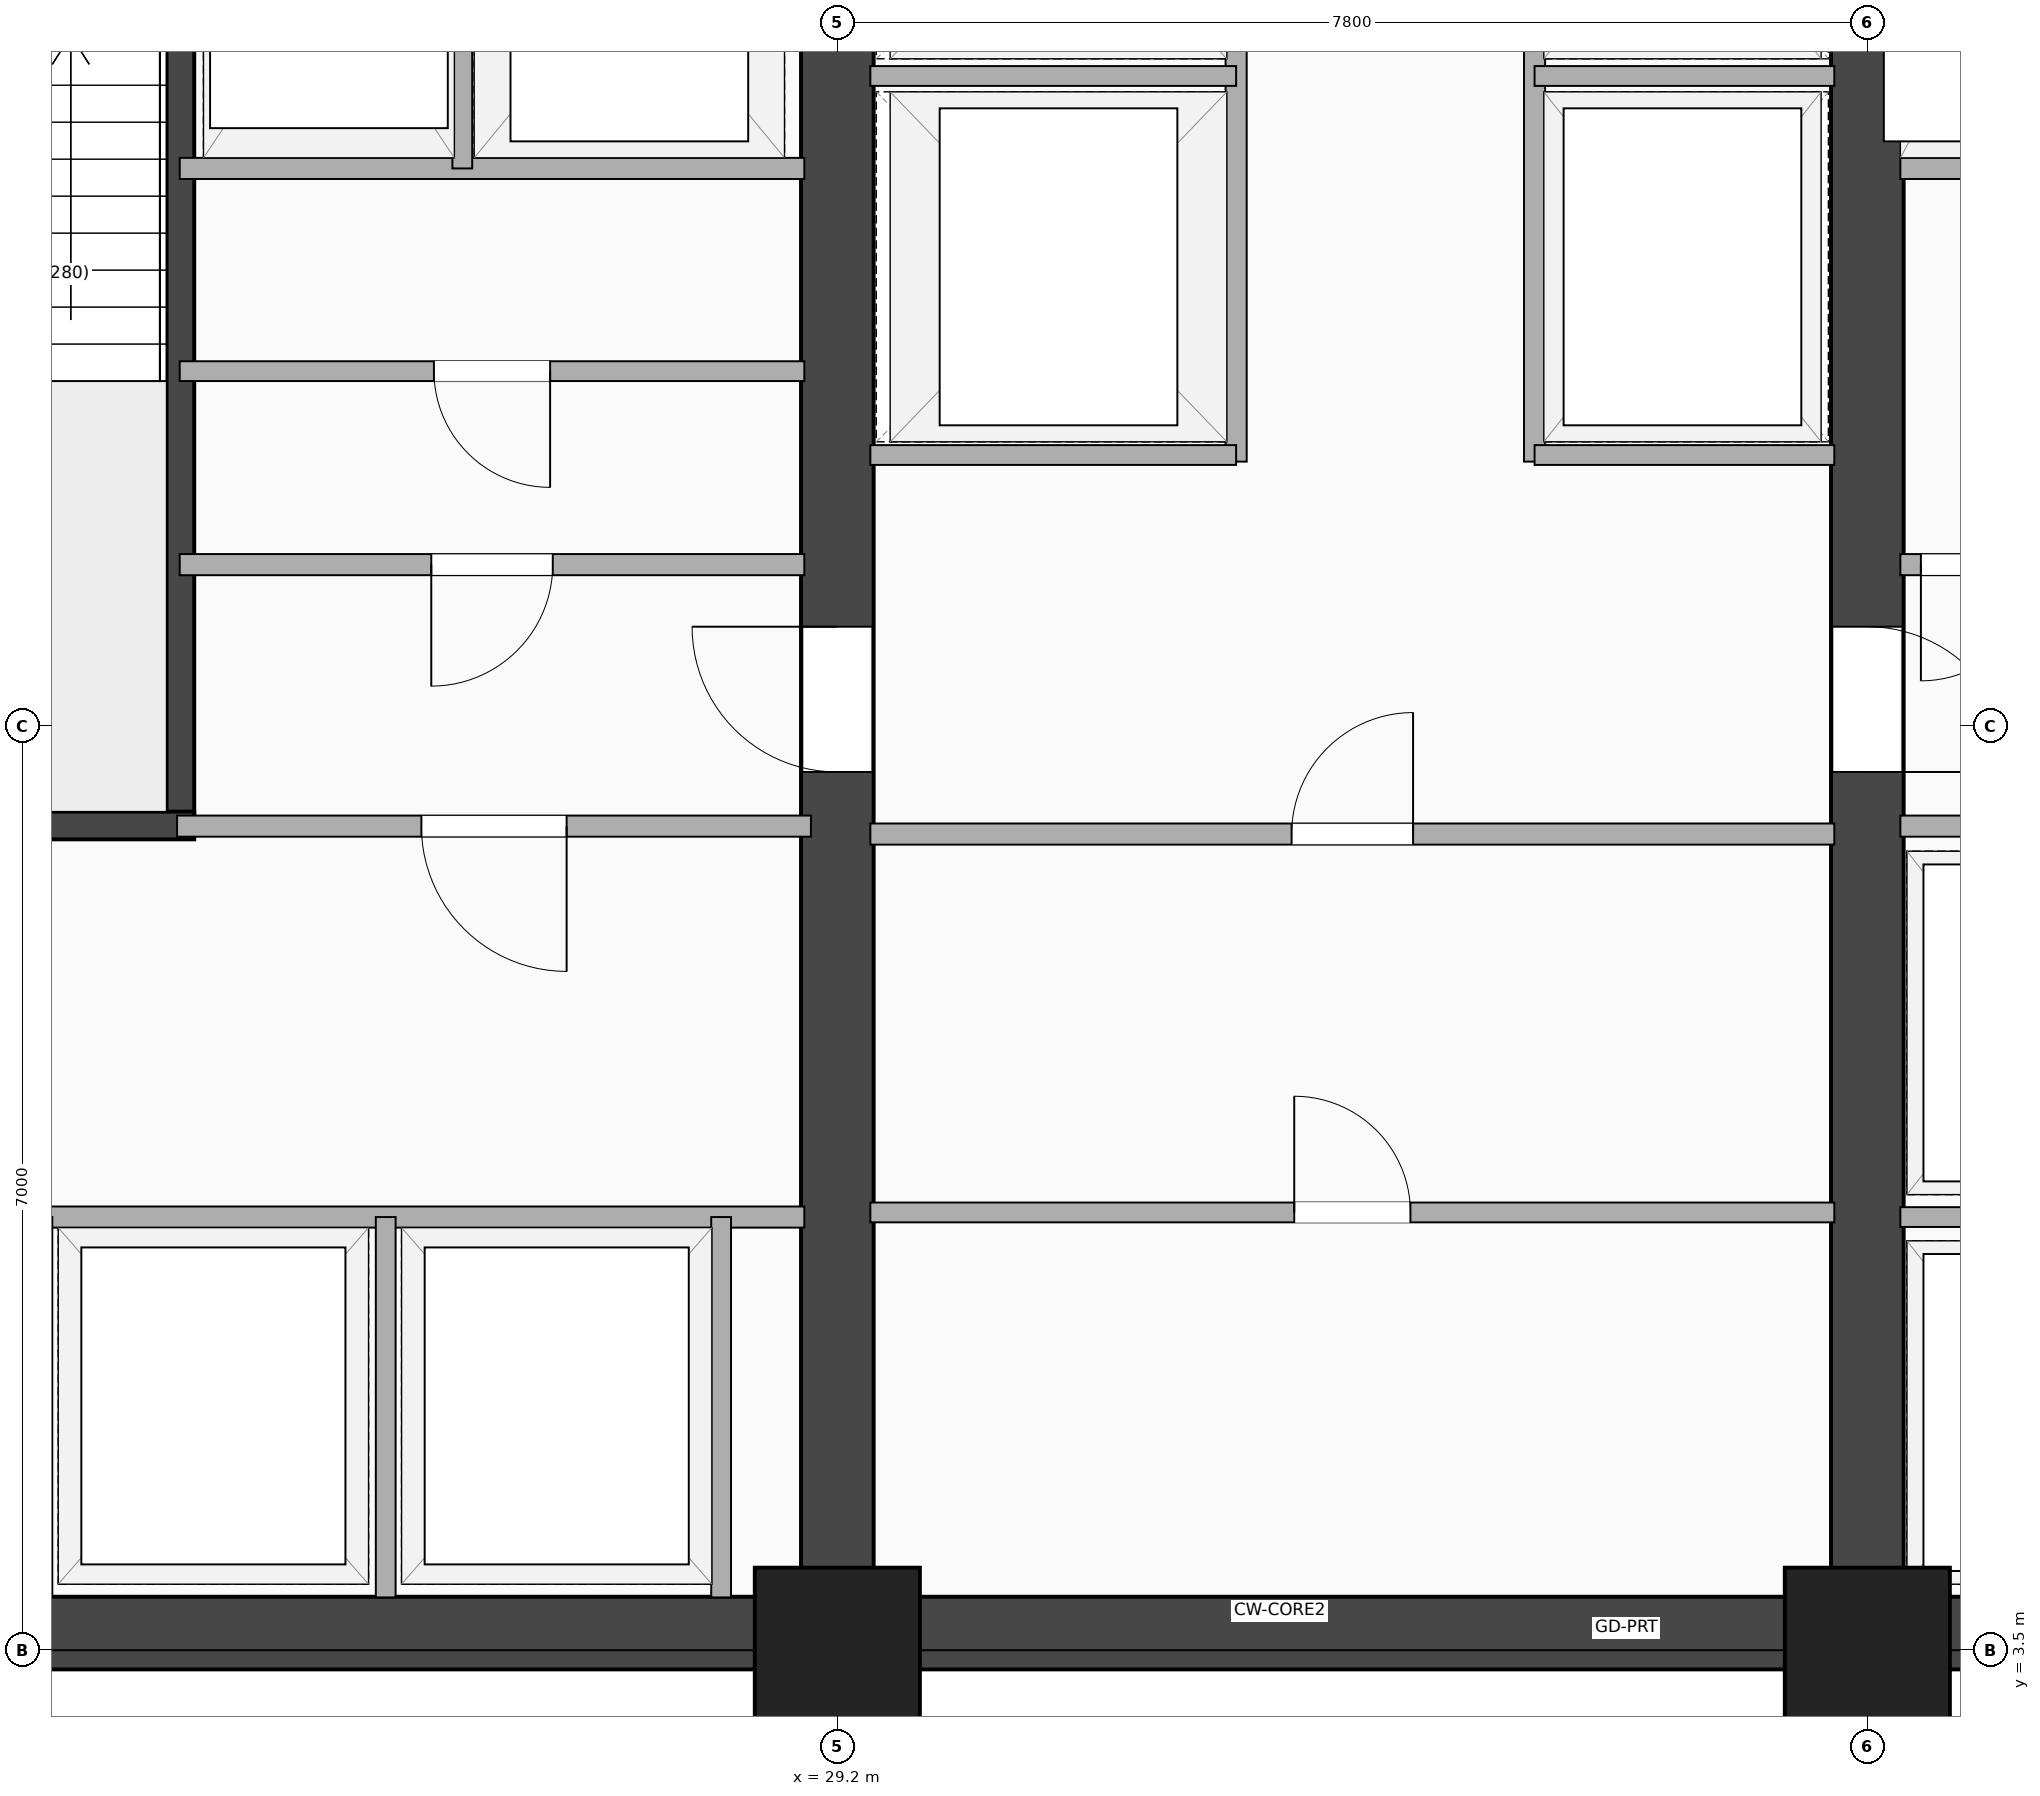
"""IFC4 building model, lengths in metres.
Left out: names, types, materials, properties, quantities, classifications, styles, units other than length and angle.
Written with IfcOpenShell. Run it as: python <this file> out.ifc"""

import sys

from ifc_helpers import new_model, si_unit, direction, frame, frame_2d, origin, origin_2d, place, context, subcontext, project, spatial, rectangle, extrude, element, fill, save


model = new_model("IFC4")
c1 = context("Model", 3, precision=1e-05, world=origin(), true_north=direction((0.0, 1.0)))
c2 = subcontext(c1, "Body", "Model", "MODEL_VIEW")
j1 = project(units=[si_unit("LENGTHUNIT", "METRE"), si_unit("PLANEANGLEUNIT", "RADIAN")], contexts=[c1])
p1 = place(None, origin())
s1 = spatial("IfcSite", under=j1, at=p1, CompositionType="ELEMENT")
p2 = place(p1, origin())
s2 = spatial("IfcBuilding", under=s1, at=p2, CompositionType="ELEMENT")
p3 = place(p2, frame((0.0, 0.0, 130.2)))
s3 = spatial("IfcBuildingStorey", under=s2, at=p3, CompositionType="ELEMENT", Elevation=130.2)
p4 = place(p3, frame((20.3, 3.63, 0.0), z_axis=(0.0, 0.0, 1.0), x_axis=(1.0, 0.0, 0.0)))
e1 = element("IfcWall", 1, at=p4, inside=s3, PredefinedType="SHEAR", context=c2, shape_type="SweptSolid", body=[
    extrude(rectangle(XDim=24.5, YDim=0.55, at=frame_2d((12.25, 0.0))), origin(), (0.0, 0.0, 1.0), 8.15),
])
p5 = place(p3, frame((29.2, 3.5, 0.0), z_axis=(0.0, 0.0, 1.0), x_axis=(0.0, 1.0, 0.0)))
e2 = element("IfcWall", 2, at=p5, inside=s3, PredefinedType="SHEAR", context=c2, shape_type="SweptSolid", body=[
    extrude(rectangle(XDim=16.9, YDim=0.55, at=frame_2d((8.45, 0.0))), origin(), (0.0, 0.0, 1.0), 8.15),
])
p6 = place(p5, frame((7.75, 0.0, 0.0), z_axis=(0.0, 0.0, 1.0), x_axis=(-1.0, 0.0, 0.0)))
e3 = element("IfcOpeningElement", 3, at=p6, cuts=e2, PredefinedType="OPENING", context=c2, shape_type="SweptSolid", body=[
    extrude(rectangle(XDim=1.1, YDim=2.15, at=frame_2d((0.55, 1.075))), frame((0.0, 0.285, 0.0), z_axis=(0.0, -1.0, 0.0), x_axis=(1.0, 0.0, 0.0)), (0.0, 0.0, 1.0), 0.57),
])
p7 = place(p3, frame((37.0, 3.5, 0.0), z_axis=(0.0, 0.0, 1.0), x_axis=(0.0, 1.0, 0.0)))
e4 = element("IfcWall", 4, at=p7, inside=s3, PredefinedType="SHEAR", context=c2, shape_type="SweptSolid", body=[
    extrude(rectangle(XDim=16.9, YDim=0.55, at=frame_2d((8.45, 0.0))), origin(), (0.0, 0.0, 1.0), 8.15),
])
p8 = place(p7, frame((6.65, 0.0, 0.0)))
e5 = element("IfcOpeningElement", 5, at=p8, cuts=e4, PredefinedType="OPENING", context=c2, shape_type="SweptSolid", body=[
    extrude(rectangle(XDim=1.1, YDim=2.15, at=frame_2d((0.55, 1.075))), frame((0.0, 0.285, 0.0), z_axis=(0.0, -1.0, 0.0), x_axis=(1.0, 0.0, 0.0)), (0.0, 0.0, 1.0), 0.57),
])
p9 = place(p3, frame((24.225, 9.745, 0.0), z_axis=(0.0, 0.0, 1.0), x_axis=(0.0, 1.0, 0.0)))
e6 = element("IfcWall", 6, at=p9, inside=s3, PredefinedType="SHEAR", context=c2, shape_type="SweptSolid", body=[
    extrude(rectangle(XDim=8.01, YDim=0.21, at=frame_2d((4.005, 0.0))), origin(), (0.0, 0.0, 1.0), 8.15),
])
p10 = place(p3, frame((20.67, 9.745, 0.0), z_axis=(0.0, 0.0, 1.0), x_axis=(1.0, 0.0, 0.0)))
e7 = element("IfcWall", 7, at=p10, inside=s3, PredefinedType="SHEAR", context=c2, shape_type="SweptSolid", body=[
    extrude(rectangle(XDim=3.66, YDim=0.21, at=frame_2d((1.83, 0.0))), origin(), (0.0, 0.0, 1.0), 8.15),
])
for number, where, z_axis, x_axis in (
    (8, (29.2, 3.5, -0.32), (0.0, 0.0, 1.0), (1.0, 0.0, 0.0)),
    (9, (37.0, 3.5, -0.32), (0.0, 0.0, 1.0), (1.0, 0.0, 0.0)),
):
    element("IfcColumn", number, at=place(p3, frame(where, z_axis=z_axis, x_axis=x_axis)), inside=s3, PredefinedType="COLUMN", context=c2, shape_type="SweptSolid", body=[
        extrude(rectangle(XDim=1.25, YDim=1.25, at=origin_2d()), origin(), (0.0, 0.0, 1.0), 8.47),
    ])
p11 = place(p3, frame((24.22, 14.72, 0.0), z_axis=(0.0, 0.0, 1.0), x_axis=(1.0, 0.0, 0.0)))
e10 = element("IfcWall", 10, at=p11, inside=s3, PredefinedType="PARTITIONING", context=c2, shape_type="SweptSolid", body=[
    extrude(rectangle(XDim=4.73, YDim=0.16, at=frame_2d((2.365, 0.0))), origin(), (0.0, 0.0, 1.0), 8.15),
])
p12 = place(p3, frame((26.36, 14.72, 0.0), z_axis=(0.0, 0.0, 1.0), x_axis=(0.0, 1.0, 0.0)))
e11 = element("IfcWall", 11, at=p12, inside=s3, PredefinedType="PARTITIONING", context=c2, shape_type="SweptSolid", body=[
    extrude(rectangle(XDim=3.04, YDim=0.15, at=frame_2d((1.52, 0.0))), origin(), (0.0, 0.0, 1.0), 8.15),
])
p13 = place(p3, frame((37.25, 14.72, 0.0), z_axis=(0.0, 0.0, 1.0), x_axis=(1.0, 0.0, 0.0)))
e12 = element("IfcWall", 12, at=p13, inside=s3, PredefinedType="PARTITIONING", context=c2, shape_type="SweptSolid", body=[
    extrude(rectangle(XDim=3.61, YDim=0.16, at=frame_2d((1.805, 0.0))), origin(), (0.0, 0.0, 1.0), 8.15),
])
p14 = place(p3, frame((24.22, 11.72, 0.0), z_axis=(0.0, 0.0, 1.0), x_axis=(1.0, 0.0, 0.0)))
e13 = element("IfcWall", 13, at=p14, inside=s3, PredefinedType="PARTITIONING", context=c2, shape_type="SweptSolid", body=[
    extrude(rectangle(XDim=4.73, YDim=0.16, at=frame_2d((2.365, 0.0))), origin(), (0.0, 0.0, 1.0), 8.15),
])
p15 = place(p14, frame((1.905, 0.0, 0.0)))
e14 = element("IfcOpeningElement", 14, at=p15, cuts=e13, PredefinedType="OPENING", context=c2, shape_type="SweptSolid", body=[
    extrude(rectangle(XDim=0.92, YDim=2.08, at=frame_2d((0.46, 1.04))), frame((0.0, 0.09, 0.0), z_axis=(0.0, -1.0, 0.0), x_axis=(1.0, 0.0, 0.0)), (0.0, 0.0, 1.0), 0.18),
])
p16 = place(p3, frame((24.22, 13.185, 0.0), z_axis=(0.0, 0.0, 1.0), x_axis=(1.0, 0.0, 0.0)))
e15 = element("IfcWall", 15, at=p16, inside=s3, PredefinedType="PARTITIONING", context=c2, shape_type="SweptSolid", body=[
    extrude(rectangle(XDim=4.73, YDim=0.15, at=frame_2d((2.365, 0.0))), origin(), (0.0, 0.0, 1.0), 8.15),
])
p17 = place(p16, frame((1.925, 0.0, 0.0)))
e16 = element("IfcOpeningElement", 16, at=p17, cuts=e15, PredefinedType="OPENING", context=c2, shape_type="SweptSolid", body=[
    extrude(rectangle(XDim=0.88, YDim=2.08, at=frame_2d((0.44, 1.04))), frame((0.0, 0.085, 0.0), z_axis=(0.0, -1.0, 0.0), x_axis=(1.0, 0.0, 0.0)), (0.0, 0.0, 1.0), 0.17),
])
p18 = place(p3, frame((37.25, 11.72, 0.0), z_axis=(0.0, 0.0, 1.0), x_axis=(1.0, 0.0, 0.0)))
e17 = element("IfcWall", 17, at=p18, inside=s3, PredefinedType="PARTITIONING", context=c2, shape_type="SweptSolid", body=[
    extrude(rectangle(XDim=1.191, YDim=0.16, at=frame_2d((0.596, 0.0))), origin(), (0.0, 0.0, 1.0), 8.15),
])
p19 = place(p18, frame((0.156, 0.0, 0.0)))
e18 = element("IfcOpeningElement", 18, at=p19, cuts=e17, PredefinedType="OPENING", context=c2, shape_type="SweptSolid", body=[
    extrude(rectangle(XDim=0.88, YDim=2.08, at=frame_2d((0.44, 1.04))), frame((0.0, 0.09, 0.0), z_axis=(0.0, -1.0, 0.0), x_axis=(1.0, 0.0, 0.0)), (0.0, 0.0, 1.0), 0.18),
])
p20 = place(p3, frame((20.65, 6.78, 0.0), z_axis=(0.0, 0.0, 1.0), x_axis=(1.0, 0.0, 0.0)))
e19 = element("IfcWall", 19, at=p20, inside=s3, PredefinedType="PARTITIONING", context=c2, shape_type="SweptSolid", body=[
    extrude(rectangle(XDim=8.3, YDim=0.16, at=frame_2d((4.15, 0.0))), origin(), (0.0, 0.0, 1.0), 7.223),
])
for number, where, z_axis, x_axis in (
    (20, (23.18, 3.9, 0.0), (0.0, 0.0, 1.0), (0.0, 1.0, 0.0)),
    (21, (25.78, 3.9, 0.0), (0.0, 0.0, 1.0), (0.0, 1.0, 0.0)),
    (22, (28.32, 3.9, 0.0), (0.0, 0.0, 1.0), (0.0, 1.0, 0.0)),
):
    element("IfcWall", number, at=place(p3, frame(where, z_axis=z_axis, x_axis=x_axis)), inside=s3, PredefinedType="PARTITIONING", context=c2, shape_type="SweptSolid", body=[
        extrude(rectangle(XDim=2.88, YDim=0.15, at=frame_2d((1.44, 0.0))), origin(), (0.0, 0.0, 1.0), 8.15),
    ])
p21 = place(p3, frame((24.2, 9.74, 0.0), z_axis=(0.0, 0.0, 1.0), x_axis=(1.0, 0.0, 0.0)))
e23 = element("IfcWall", 23, at=p21, inside=s3, PredefinedType="PARTITIONING", context=c2, shape_type="SweptSolid", body=[
    extrude(rectangle(XDim=4.8, YDim=0.16, at=frame_2d((2.4, 0.0))), origin(), (0.0, 0.0, 1.0), 8.15),
])
p22 = place(p21, frame((1.85, 0.0, 0.0)))
e24 = element("IfcOpeningElement", 24, at=p22, cuts=e23, PredefinedType="OPENING", context=c2, shape_type="SweptSolid", body=[
    extrude(rectangle(XDim=1.1, YDim=2.15, at=frame_2d((0.55, 1.075))), frame((0.0, 0.09, 0.0), z_axis=(0.0, -1.0, 0.0), x_axis=(1.0, 0.0, 0.0)), (0.0, 0.0, 1.0), 0.18),
])
p23 = place(p3, frame((37.25, 6.78, 0.0), z_axis=(0.0, 0.0, 1.0), x_axis=(1.0, 0.0, 0.0)))
e25 = element("IfcWall", 25, at=p23, inside=s3, PredefinedType="PARTITIONING", context=c2, shape_type="SweptSolid", body=[
    extrude(rectangle(XDim=2.17, YDim=0.15, at=frame_2d((1.085, 0.0))), origin(), (0.0, 0.0, 1.0), 8.15),
])
p24 = place(p3, frame((37.25, 9.74, 0.0), z_axis=(0.0, 0.0, 1.0), x_axis=(1.0, 0.0, 0.0)))
e26 = element("IfcWall", 26, at=p24, inside=s3, PredefinedType="PARTITIONING", context=c2, shape_type="SweptSolid", body=[
    extrude(rectangle(XDim=2.17, YDim=0.16, at=frame_2d((1.085, 0.0))), origin(), (0.0, 0.0, 1.0), 8.15),
])
p25 = place(p3, frame((29.45, 9.68, 0.0), z_axis=(0.0, 0.0, 1.0), x_axis=(1.0, 0.0, 0.0)))
e27 = element("IfcWall", 27, at=p25, inside=s3, PredefinedType="PARTITIONING", context=c2, shape_type="SweptSolid", body=[
    extrude(rectangle(XDim=7.3, YDim=0.16, at=frame_2d((3.65, 0.0))), origin(), (0.0, 0.0, 1.0), 8.15),
])
p26 = place(p25, frame((4.11, 0.0, 0.0), z_axis=(0.0, 0.0, 1.0), x_axis=(-1.0, 0.0, 0.0)))
e28 = element("IfcOpeningElement", 28, at=p26, cuts=e27, PredefinedType="OPENING", context=c2, shape_type="SweptSolid", body=[
    extrude(rectangle(XDim=0.92, YDim=2.08, at=frame_2d((0.46, 1.04))), frame((0.0, 0.09, 0.0), z_axis=(0.0, -1.0, 0.0), x_axis=(1.0, 0.0, 0.0)), (0.0, 0.0, 1.0), 0.18),
])
p27 = place(p3, frame((29.45, 6.815, 0.0), z_axis=(0.0, 0.0, 1.0), x_axis=(1.0, 0.0, 0.0)))
e29 = element("IfcWall", 29, at=p27, inside=s3, PredefinedType="PARTITIONING", context=c2, shape_type="SweptSolid", body=[
    extrude(rectangle(XDim=7.3, YDim=0.15, at=frame_2d((3.65, 0.0))), origin(), (0.0, 0.0, 1.0), 8.15),
])
p28 = place(p27, frame((4.09, 0.0, 0.0), z_axis=(0.0, 0.0, 1.0), x_axis=(-1.0, 0.0, 0.0)))
e30 = element("IfcOpeningElement", 30, at=p28, cuts=e29, PredefinedType="OPENING", context=c2, shape_type="SweptSolid", body=[
    extrude(rectangle(XDim=0.88, YDim=2.08, at=frame_2d((0.44, 1.04))), frame((0.0, 0.085, 0.0), z_axis=(0.0, -1.0, 0.0), x_axis=(1.0, 0.0, 0.0)), (0.0, 0.0, 1.0), 0.17),
])
p29 = place(p3, frame((32.22, 12.5, 0.0), z_axis=(0.0, 0.0, 1.0), x_axis=(0.0, 1.0, 0.0)))
e31 = element("IfcWall", 31, at=p29, inside=s3, PredefinedType="PARTITIONING", context=c2, shape_type="SweptSolid", body=[
    extrude(rectangle(XDim=7.92, YDim=0.16, at=frame_2d((3.96, 0.0))), origin(), (0.0, 0.0, 1.0), 7.524),
])
p30 = place(p29, frame((6.1, 0.0, 0.0)))
e32 = element("IfcOpeningElement", 32, at=p30, cuts=e31, PredefinedType="OPENING", context=c2, shape_type="SweptSolid", body=[
    extrude(rectangle(XDim=0.88, YDim=2.08, at=frame_2d((0.44, 1.04))), frame((0.0, 0.09, 0.0), z_axis=(0.0, -1.0, 0.0), x_axis=(1.0, 0.0, 0.0)), (0.0, 0.0, 1.0), 0.18),
])
p31 = place(p3, frame((34.48, 12.5, 0.0), z_axis=(0.0, 0.0, 1.0), x_axis=(0.0, 1.0, 0.0)))
e33 = element("IfcWall", 33, at=p31, inside=s3, PredefinedType="PARTITIONING", context=c2, shape_type="SweptSolid", body=[
    extrude(rectangle(XDim=7.92, YDim=0.16, at=frame_2d((3.96, 0.0))), origin(), (0.0, 0.0, 1.0), 7.524),
])
p32 = place(p31, frame((6.98, 0.0, 0.0), z_axis=(0.0, 0.0, 1.0), x_axis=(-1.0, 0.0, 0.0)))
e34 = element("IfcOpeningElement", 34, at=p32, cuts=e33, PredefinedType="OPENING", context=c2, shape_type="SweptSolid", body=[
    extrude(rectangle(XDim=0.88, YDim=2.08, at=frame_2d((0.44, 1.04))), frame((0.0, 0.09, 0.0), z_axis=(0.0, -1.0, 0.0), x_axis=(1.0, 0.0, 0.0)), (0.0, 0.0, 1.0), 0.18),
])
p33 = place(p3, frame((29.45, 12.55, 0.0), z_axis=(0.0, 0.0, 1.0), x_axis=(1.0, 0.0, 0.0)))
e35 = element("IfcWall", 35, at=p33, inside=s3, PredefinedType="PARTITIONING", context=c2, shape_type="SweptSolid", body=[
    extrude(rectangle(XDim=2.77, YDim=0.15, at=frame_2d((1.385, 0.0))), origin(), (0.0, 0.0, 1.0), 8.15),
])
p34 = place(p3, frame((34.48, 12.55, 0.0), z_axis=(0.0, 0.0, 1.0), x_axis=(1.0, 0.0, 0.0)))
e36 = element("IfcWall", 36, at=p34, inside=s3, PredefinedType="PARTITIONING", context=c2, shape_type="SweptSolid", body=[
    extrude(rectangle(XDim=2.27, YDim=0.15, at=frame_2d((1.135, 0.0))), origin(), (0.0, 0.0, 1.0), 8.15),
])
p35 = place(p3, frame((29.45, 15.42, 0.0), z_axis=(0.0, 0.0, 1.0), x_axis=(1.0, 0.0, 0.0)))
e37 = element("IfcWall", 37, at=p35, inside=s3, PredefinedType="PARTITIONING", context=c2, shape_type="SweptSolid", body=[
    extrude(rectangle(XDim=2.77, YDim=0.15, at=frame_2d((1.385, 0.0))), origin(), (0.0, 0.0, 1.0), 8.15),
])
p36 = place(p3, frame((34.48, 15.42, 0.0), z_axis=(0.0, 0.0, 1.0), x_axis=(1.0, 0.0, 0.0)))
e38 = element("IfcWall", 38, at=p36, inside=s3, PredefinedType="PARTITIONING", context=c2, shape_type="SweptSolid", body=[
    extrude(rectangle(XDim=2.27, YDim=0.15, at=frame_2d((1.135, 0.0))), origin(), (0.0, 0.0, 1.0), 8.15),
])
p37 = place(p6, origin())
e39 = element("IfcDoor", 39, at=p37, inside=s3, OperationType="SINGLE_SWING_RIGHT", PredefinedType="DOOR", context=c2, shape_type="SweptSolid", body=[
    extrude(rectangle(XDim=1.1, YDim=2.15, at=frame_2d((0.55, 1.075))), frame((0.0, 0.025, 0.0), z_axis=(0.0, -1.0, 0.0), x_axis=(1.0, 0.0, 0.0)), (0.0, 0.0, 1.0), 0.05),
])
fill(e3, e39)
p38 = place(p8, origin())
e40 = element("IfcDoor", 40, at=p38, inside=s3, OperationType="SINGLE_SWING_LEFT", PredefinedType="DOOR", context=c2, shape_type="SweptSolid", body=[
    extrude(rectangle(XDim=1.1, YDim=2.15, at=frame_2d((0.55, 1.075))), frame((0.0, 0.025, 0.0), z_axis=(0.0, -1.0, 0.0), x_axis=(1.0, 0.0, 0.0)), (0.0, 0.0, 1.0), 0.05),
])
fill(e5, e40)
p39 = place(p15, origin())
e41 = element("IfcDoor", 41, at=p39, inside=s3, OperationType="SINGLE_SWING_LEFT", PredefinedType="DOOR", context=c2, shape_type="SweptSolid", body=[
    extrude(rectangle(XDim=0.92, YDim=2.08, at=frame_2d((0.46, 1.04))), frame((0.0, 0.025, 0.0), z_axis=(0.0, -1.0, 0.0), x_axis=(1.0, 0.0, 0.0)), (0.0, 0.0, 1.0), 0.05),
])
fill(e14, e41)
p40 = place(p17, origin())
e42 = element("IfcDoor", 42, at=p40, inside=s3, OperationType="SINGLE_SWING_RIGHT", PredefinedType="DOOR", context=c2, shape_type="SweptSolid", body=[
    extrude(rectangle(XDim=0.88, YDim=2.08, at=frame_2d((0.44, 1.04))), frame((0.0, 0.025, 0.0), z_axis=(0.0, -1.0, 0.0), x_axis=(1.0, 0.0, 0.0)), (0.0, 0.0, 1.0), 0.05),
])
fill(e16, e42)
p41 = place(p19, origin())
e43 = element("IfcDoor", 43, at=p41, inside=s3, OperationType="SINGLE_SWING_LEFT", PredefinedType="DOOR", context=c2, shape_type="SweptSolid", body=[
    extrude(rectangle(XDim=0.88, YDim=2.08, at=frame_2d((0.44, 1.04))), frame((0.0, 0.025, 0.0), z_axis=(0.0, -1.0, 0.0), x_axis=(1.0, 0.0, 0.0)), (0.0, 0.0, 1.0), 0.05),
])
fill(e18, e43)
p42 = place(p22, origin())
e44 = element("IfcDoor", 44, at=p42, inside=s3, OperationType="SINGLE_SWING_RIGHT", PredefinedType="DOOR", context=c2, shape_type="SweptSolid", body=[
    extrude(rectangle(XDim=1.1, YDim=2.15, at=frame_2d((0.55, 1.075))), frame((0.0, 0.025, 0.0), z_axis=(0.0, -1.0, 0.0), x_axis=(1.0, 0.0, 0.0)), (0.0, 0.0, 1.0), 0.05),
])
fill(e24, e44)
p43 = place(p26, origin())
e45 = element("IfcDoor", 45, at=p43, inside=s3, OperationType="SINGLE_SWING_RIGHT", PredefinedType="DOOR", context=c2, shape_type="SweptSolid", body=[
    extrude(rectangle(XDim=0.92, YDim=2.08, at=frame_2d((0.46, 1.04))), frame((0.0, 0.025, 0.0), z_axis=(0.0, -1.0, 0.0), x_axis=(1.0, 0.0, 0.0)), (0.0, 0.0, 1.0), 0.05),
])
fill(e28, e45)
p44 = place(p28, origin())
e46 = element("IfcDoor", 46, at=p44, inside=s3, OperationType="SINGLE_SWING_LEFT", PredefinedType="DOOR", context=c2, shape_type="SweptSolid", body=[
    extrude(rectangle(XDim=0.88, YDim=2.08, at=frame_2d((0.44, 1.04))), frame((0.0, 0.025, 0.0), z_axis=(0.0, -1.0, 0.0), x_axis=(1.0, 0.0, 0.0)), (0.0, 0.0, 1.0), 0.05),
])
fill(e30, e46)
save(model, sys.argv[1])
